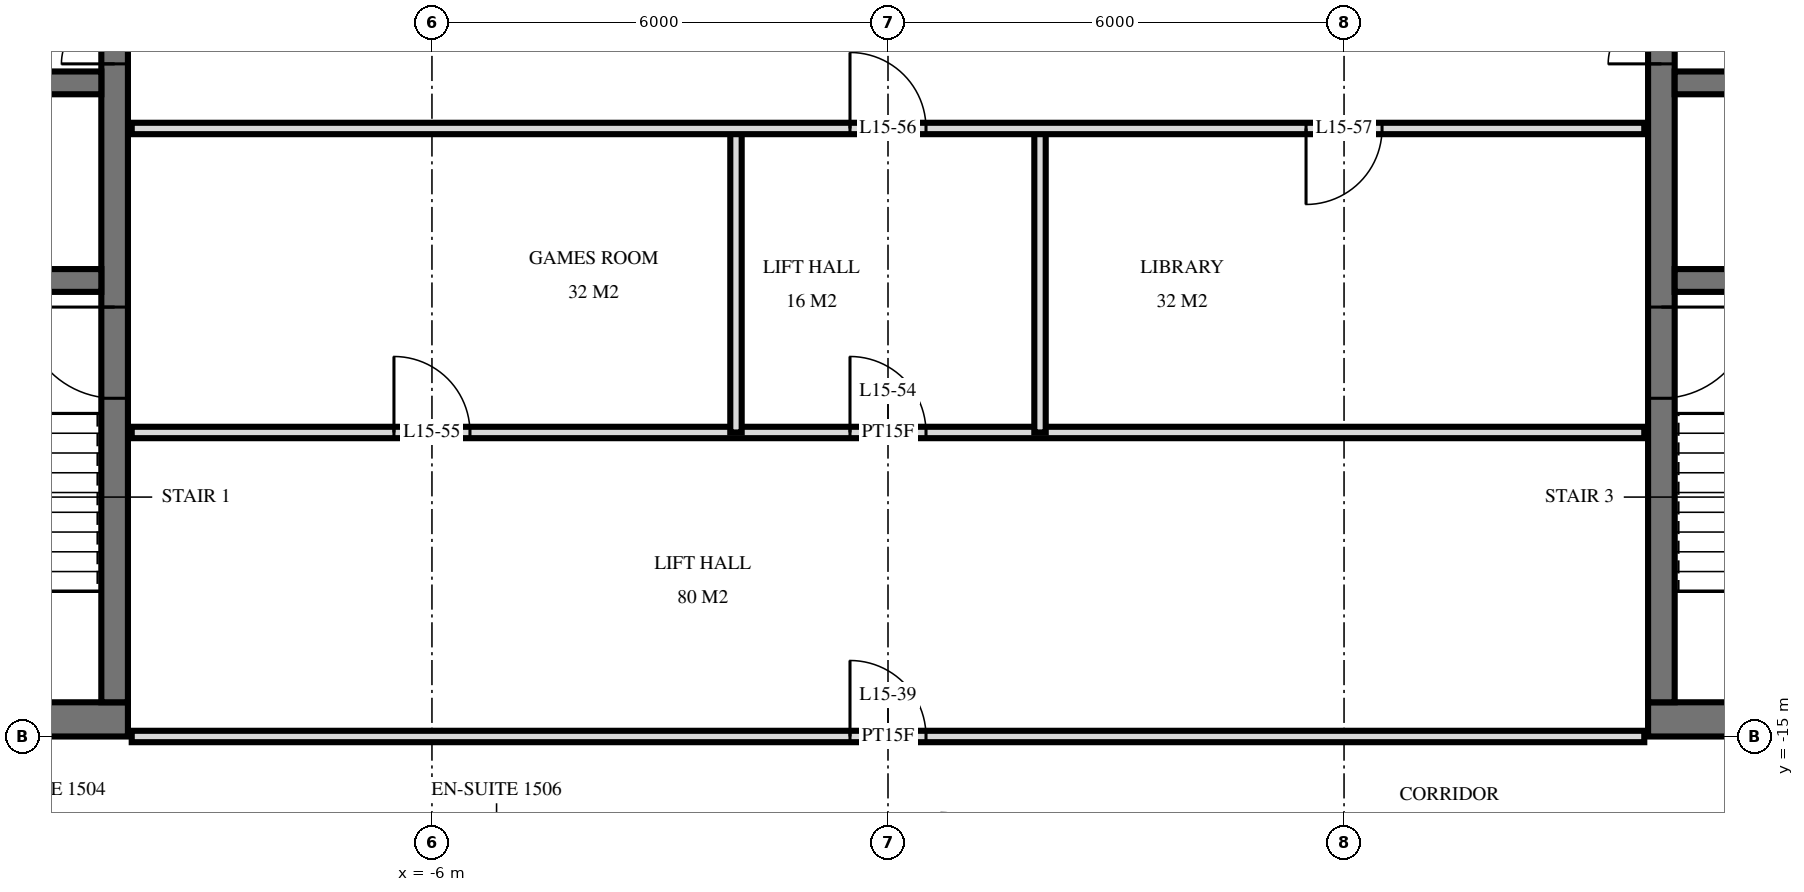
"""IFC4 building model, lengths in metres.
Left out: names, types, materials, properties, quantities, classifications, styles, units other than length and angle.
Written with IfcOpenShell. Run it as: python <this file> out.ifc"""

import sys

from ifc_helpers import new_model, si_unit, direction, frame, frame_2d, origin, place, context, subcontext, project, spatial, rectangle, extrude, element, fill, save


model = new_model("IFC4")
c1 = context("Model", 3, precision=1e-05, world=origin(), true_north=direction((0.0, 1.0)))
c2 = subcontext(c1, "Body", "Model", "MODEL_VIEW")
j1 = project(units=[si_unit("LENGTHUNIT", "METRE"), si_unit("PLANEANGLEUNIT", "RADIAN")], contexts=[c1])
p1 = place(None, origin())
s1 = spatial("IfcSite", under=j1, at=p1, CompositionType="ELEMENT")
p2 = place(p1, origin())
s2 = spatial("IfcBuilding", under=s1, at=p2, CompositionType="ELEMENT")
p3 = place(p2, frame((0.0, 0.0, 63.6)))
s3 = spatial("IfcBuildingStorey", under=s2, at=p3, CompositionType="ELEMENT", Elevation=63.6)
p4 = place(p3, frame((-29.5, -14.775, 0.0), z_axis=(0.0, 0.0, 1.0), x_axis=(1.0, 0.0, 0.0)))
e1 = element("IfcWall", 1, at=p4, inside=s3, PredefinedType="SHEAR", context=c2, shape_type="SweptSolid", body=[
    extrude(rectangle(XDim=19.5, YDim=0.45, at=frame_2d((9.75, 0.0))), origin(), (0.0, 0.0, 1.0), 3.6),
])
p5 = place(p4, frame((11.2, 0.0, 0.0)))
e2 = element("IfcOpeningElement", 2, at=p5, cuts=e1, PredefinedType="OPENING", context=c2, shape_type="SweptSolid", body=[
    extrude(rectangle(XDim=1.2, YDim=2.1, at=frame_2d((0.6, 1.05))), frame((0.0, 0.235, 0.0), z_axis=(0.0, -1.0, 0.0), x_axis=(1.0, 0.0, 0.0)), (0.0, 0.0, 1.0), 0.47),
])
p6 = place(p4, frame((14.25, 0.0, 0.0)))
e3 = element("IfcOpeningElement", 3, at=p6, cuts=e1, PredefinedType="OPENING", context=c2, shape_type="SweptSolid", body=[
    extrude(rectangle(XDim=1.1, YDim=2.1, at=frame_2d((0.55, 1.05))), frame((0.0, 0.235, 0.0), z_axis=(0.0, -1.0, 0.0), x_axis=(1.0, 0.0, 0.0)), (0.0, 0.0, 1.0), 0.47),
])
p7 = place(p4, frame((8.5, 0.0, 0.0)))
e4 = element("IfcOpeningElement", 4, at=p7, cuts=e1, PredefinedType="OPENING", context=c2, shape_type="SweptSolid", body=[
    extrude(rectangle(XDim=0.9, YDim=2.1, at=frame_2d((0.45, 1.05))), frame((0.0, 0.235, 0.0), z_axis=(0.0, -1.0, 0.0), x_axis=(1.0, 0.0, 0.0)), (0.0, 0.0, 1.0), 0.47),
])
p8 = place(p4, frame((6.05, 0.0, 0.0)))
e5 = element("IfcOpeningElement", 5, at=p8, cuts=e1, PredefinedType="OPENING", context=c2, shape_type="SweptSolid", body=[
    extrude(rectangle(XDim=1.0, YDim=2.1, at=frame_2d((0.5, 1.05))), frame((0.0, 0.235, 0.0), z_axis=(0.0, -1.0, 0.0), x_axis=(1.0, 0.0, 0.0)), (0.0, 0.0, 1.0), 0.47),
])
p9 = place(p4, frame((2.25, 0.0, 0.0)))
e6 = element("IfcOpeningElement", 6, at=p9, cuts=e1, PredefinedType="OPENING", context=c2, shape_type="SweptSolid", body=[
    extrude(rectangle(XDim=1.0, YDim=2.1, at=frame_2d((0.5, 1.05))), frame((0.0, 0.235, 0.0), z_axis=(0.0, -1.0, 0.0), x_axis=(1.0, 0.0, 0.0)), (0.0, 0.0, 1.0), 0.47),
])
p10 = place(p3, frame((-10.175, -14.55, 0.0), z_axis=(0.0, 0.0, 1.0), x_axis=(0.0, 1.0, 0.0)))
e7 = element("IfcWall", 7, at=p10, inside=s3, PredefinedType="SHEAR", context=c2, shape_type="SweptSolid", body=[
    extrude(rectangle(XDim=14.1, YDim=0.35, at=frame_2d((7.05, 0.0))), origin(), (0.0, 0.0, 1.0), 3.6),
])
p11 = place(p10, frame((8.4, 0.0, 0.0)))
e8 = element("IfcOpeningElement", 8, at=p11, cuts=e7, PredefinedType="OPENING", context=c2, shape_type="SweptSolid", body=[
    extrude(rectangle(XDim=1.4, YDim=2.4, at=frame_2d((0.7, 1.2))), frame((0.0, 0.185, 0.0), z_axis=(0.0, -1.0, 0.0), x_axis=(1.0, 0.0, 0.0)), (0.0, 0.0, 1.0), 0.37),
])
p12 = place(p10, frame((10.0, 0.0, 0.0)))
e9 = element("IfcOpeningElement", 9, at=p12, cuts=e7, PredefinedType="OPENING", context=c2, shape_type="SweptSolid", body=[
    extrude(rectangle(XDim=1.4, YDim=2.4, at=frame_2d((0.7, 1.2))), frame((0.0, 0.185, 0.0), z_axis=(0.0, -1.0, 0.0), x_axis=(1.0, 0.0, 0.0)), (0.0, 0.0, 1.0), 0.37),
])
p13 = place(p10, frame((4.0, 0.0, 0.0)))
e10 = element("IfcOpeningElement", 10, at=p13, cuts=e7, PredefinedType="OPENING", context=c2, shape_type="SweptSolid", body=[
    extrude(rectangle(XDim=1.2, YDim=2.1, at=frame_2d((0.6, 1.05))), frame((0.0, 0.185, 0.0), z_axis=(0.0, -1.0, 0.0), x_axis=(1.0, 0.0, 0.0)), (0.0, 0.0, 1.0), 0.37),
])
p14 = place(p3, frame((-29.05, -6.4, 0.0), z_axis=(0.0, 0.0, 1.0), x_axis=(1.0, 0.0, 0.0)))
e11 = element("IfcWall", 11, at=p14, inside=s3, PredefinedType="SHEAR", context=c2, shape_type="SweptSolid", body=[
    extrude(rectangle(XDim=18.7, YDim=0.3, at=frame_2d((9.35, 0.0))), origin(), (0.0, 0.0, 1.0), 3.6),
])
p15 = place(p14, frame((2.95, 0.0, 0.0)))
e12 = element("IfcOpeningElement", 12, at=p15, cuts=e11, PredefinedType="OPENING", context=c2, shape_type="SweptSolid", body=[
    extrude(rectangle(XDim=1.1, YDim=2.1, at=frame_2d((0.55, 1.05))), frame((0.0, 0.16, 0.0), z_axis=(0.0, -1.0, 0.0), x_axis=(1.0, 0.0, 0.0)), (0.0, 0.0, 1.0), 0.32),
])
p16 = place(p14, frame((0.55, 0.0, 0.0)))
e13 = element("IfcOpeningElement", 13, at=p16, cuts=e11, PredefinedType="OPENING", context=c2, shape_type="SweptSolid", body=[
    extrude(rectangle(XDim=1.1, YDim=2.1, at=frame_2d((0.55, 1.05))), frame((0.0, 0.16, 0.0), z_axis=(0.0, -1.0, 0.0), x_axis=(1.0, 0.0, 0.0)), (0.0, 0.0, 1.0), 0.32),
])
p17 = place(p14, frame((10.8, 0.0, 0.0)))
e14 = element("IfcOpeningElement", 14, at=p17, cuts=e11, PredefinedType="OPENING", context=c2, shape_type="SweptSolid", body=[
    extrude(rectangle(XDim=1.1, YDim=2.1, at=frame_2d((0.55, 1.05))), frame((0.0, 0.16, 0.0), z_axis=(0.0, -1.0, 0.0), x_axis=(1.0, 0.0, 0.0)), (0.0, 0.0, 1.0), 0.32),
])
p18 = place(p14, frame((5.6, 0.0, 0.0)))
e15 = element("IfcOpeningElement", 15, at=p18, cuts=e11, PredefinedType="OPENING", context=c2, shape_type="SweptSolid", body=[
    extrude(rectangle(XDim=1.0, YDim=2.1, at=frame_2d((0.5, 1.05))), frame((0.0, 0.16, 0.0), z_axis=(0.0, -1.0, 0.0), x_axis=(1.0, 0.0, 0.0)), (0.0, 0.0, 1.0), 0.32),
])
p19 = place(p3, frame((-29.05, -9.0, 0.0), z_axis=(0.0, 0.0, 1.0), x_axis=(1.0, 0.0, 0.0)))
e16 = element("IfcWall", 16, at=p19, inside=s3, PredefinedType="SHEAR", context=c2, shape_type="SweptSolid", body=[
    extrude(rectangle(XDim=18.7, YDim=0.3, at=frame_2d((9.35, 0.0))), origin(), (0.0, 0.0, 1.0), 3.6),
])
p20 = place(p19, frame((13.8, 0.0, 0.0)))
e17 = element("IfcOpeningElement", 17, at=p20, cuts=e16, PredefinedType="OPENING", context=c2, shape_type="SweptSolid", body=[
    extrude(rectangle(XDim=1.1, YDim=2.1, at=frame_2d((0.55, 1.05))), frame((0.0, 0.16, 0.0), z_axis=(0.0, -1.0, 0.0), x_axis=(1.0, 0.0, 0.0)), (0.0, 0.0, 1.0), 0.32),
])
p21 = place(p3, frame((10.0, -14.775, 0.0), z_axis=(0.0, 0.0, 1.0), x_axis=(1.0, 0.0, 0.0)))
e18 = element("IfcWall", 18, at=p21, inside=s3, PredefinedType="SHEAR", context=c2, shape_type="SweptSolid", body=[
    extrude(rectangle(XDim=19.5, YDim=0.45, at=frame_2d((9.75, 0.0))), origin(), (0.0, 0.0, 1.0), 3.6),
])
p22 = place(p21, frame((7.1, 0.0, 0.0)))
e19 = element("IfcOpeningElement", 19, at=p22, cuts=e18, PredefinedType="OPENING", context=c2, shape_type="SweptSolid", body=[
    extrude(rectangle(XDim=1.2, YDim=2.1, at=frame_2d((0.6, 1.05))), frame((0.0, 0.235, 0.0), z_axis=(0.0, -1.0, 0.0), x_axis=(1.0, 0.0, 0.0)), (0.0, 0.0, 1.0), 0.47),
])
p23 = place(p21, frame((4.15, 0.0, 0.0)))
e20 = element("IfcOpeningElement", 20, at=p23, cuts=e18, PredefinedType="OPENING", context=c2, shape_type="SweptSolid", body=[
    extrude(rectangle(XDim=1.1, YDim=2.1, at=frame_2d((0.55, 1.05))), frame((0.0, 0.235, 0.0), z_axis=(0.0, -1.0, 0.0), x_axis=(1.0, 0.0, 0.0)), (0.0, 0.0, 1.0), 0.47),
])
p24 = place(p21, frame((10.1, 0.0, 0.0)))
e21 = element("IfcOpeningElement", 21, at=p24, cuts=e18, PredefinedType="OPENING", context=c2, shape_type="SweptSolid", body=[
    extrude(rectangle(XDim=0.9, YDim=2.1, at=frame_2d((0.45, 1.05))), frame((0.0, 0.235, 0.0), z_axis=(0.0, -1.0, 0.0), x_axis=(1.0, 0.0, 0.0)), (0.0, 0.0, 1.0), 0.47),
])
p25 = place(p21, frame((12.45, 0.0, 0.0)))
e22 = element("IfcOpeningElement", 22, at=p25, cuts=e18, PredefinedType="OPENING", context=c2, shape_type="SweptSolid", body=[
    extrude(rectangle(XDim=1.0, YDim=2.1, at=frame_2d((0.5, 1.05))), frame((0.0, 0.235, 0.0), z_axis=(0.0, -1.0, 0.0), x_axis=(1.0, 0.0, 0.0)), (0.0, 0.0, 1.0), 0.47),
])
p26 = place(p21, frame((16.25, 0.0, 0.0)))
e23 = element("IfcOpeningElement", 23, at=p26, cuts=e18, PredefinedType="OPENING", context=c2, shape_type="SweptSolid", body=[
    extrude(rectangle(XDim=1.0, YDim=2.1, at=frame_2d((0.5, 1.05))), frame((0.0, 0.235, 0.0), z_axis=(0.0, -1.0, 0.0), x_axis=(1.0, 0.0, 0.0)), (0.0, 0.0, 1.0), 0.47),
])
p27 = place(p3, frame((10.175, -14.55, 0.0), z_axis=(0.0, 0.0, 1.0), x_axis=(0.0, 1.0, 0.0)))
e24 = element("IfcWall", 24, at=p27, inside=s3, PredefinedType="SHEAR", context=c2, shape_type="SweptSolid", body=[
    extrude(rectangle(XDim=14.1, YDim=0.35, at=frame_2d((7.05, 0.0))), origin(), (0.0, 0.0, 1.0), 3.6),
])
p28 = place(p27, frame((8.4, 0.0, 0.0)))
e25 = element("IfcOpeningElement", 25, at=p28, cuts=e24, PredefinedType="OPENING", context=c2, shape_type="SweptSolid", body=[
    extrude(rectangle(XDim=1.4, YDim=2.4, at=frame_2d((0.7, 1.2))), frame((0.0, 0.185, 0.0), z_axis=(0.0, -1.0, 0.0), x_axis=(1.0, 0.0, 0.0)), (0.0, 0.0, 1.0), 0.37),
])
p29 = place(p27, frame((10.0, 0.0, 0.0)))
e26 = element("IfcOpeningElement", 26, at=p29, cuts=e24, PredefinedType="OPENING", context=c2, shape_type="SweptSolid", body=[
    extrude(rectangle(XDim=1.4, YDim=2.4, at=frame_2d((0.7, 1.2))), frame((0.0, 0.185, 0.0), z_axis=(0.0, -1.0, 0.0), x_axis=(1.0, 0.0, 0.0)), (0.0, 0.0, 1.0), 0.37),
])
p30 = place(p27, frame((4.0, 0.0, 0.0)))
e27 = element("IfcOpeningElement", 27, at=p30, cuts=e24, PredefinedType="OPENING", context=c2, shape_type="SweptSolid", body=[
    extrude(rectangle(XDim=1.2, YDim=2.1, at=frame_2d((0.6, 1.05))), frame((0.0, 0.185, 0.0), z_axis=(0.0, -1.0, 0.0), x_axis=(1.0, 0.0, 0.0)), (0.0, 0.0, 1.0), 0.37),
])
p31 = place(p3, frame((10.35, -6.4, 0.0), z_axis=(0.0, 0.0, 1.0), x_axis=(1.0, 0.0, 0.0)))
e28 = element("IfcWall", 28, at=p31, inside=s3, PredefinedType="SHEAR", context=c2, shape_type="SweptSolid", body=[
    extrude(rectangle(XDim=18.7, YDim=0.3, at=frame_2d((9.35, 0.0))), origin(), (0.0, 0.0, 1.0), 3.6),
])
p32 = place(p31, frame((14.65, 0.0, 0.0)))
e29 = element("IfcOpeningElement", 29, at=p32, cuts=e28, PredefinedType="OPENING", context=c2, shape_type="SweptSolid", body=[
    extrude(rectangle(XDim=1.1, YDim=2.1, at=frame_2d((0.55, 1.05))), frame((0.0, 0.16, 0.0), z_axis=(0.0, -1.0, 0.0), x_axis=(1.0, 0.0, 0.0)), (0.0, 0.0, 1.0), 0.32),
])
p33 = place(p31, frame((17.05, 0.0, 0.0)))
e30 = element("IfcOpeningElement", 30, at=p33, cuts=e28, PredefinedType="OPENING", context=c2, shape_type="SweptSolid", body=[
    extrude(rectangle(XDim=1.1, YDim=2.1, at=frame_2d((0.55, 1.05))), frame((0.0, 0.16, 0.0), z_axis=(0.0, -1.0, 0.0), x_axis=(1.0, 0.0, 0.0)), (0.0, 0.0, 1.0), 0.32),
])
p34 = place(p31, frame((6.8, 0.0, 0.0)))
e31 = element("IfcOpeningElement", 31, at=p34, cuts=e28, PredefinedType="OPENING", context=c2, shape_type="SweptSolid", body=[
    extrude(rectangle(XDim=1.1, YDim=2.1, at=frame_2d((0.55, 1.05))), frame((0.0, 0.16, 0.0), z_axis=(0.0, -1.0, 0.0), x_axis=(1.0, 0.0, 0.0)), (0.0, 0.0, 1.0), 0.32),
])
p35 = place(p31, frame((12.1, 0.0, 0.0)))
e32 = element("IfcOpeningElement", 32, at=p35, cuts=e28, PredefinedType="OPENING", context=c2, shape_type="SweptSolid", body=[
    extrude(rectangle(XDim=1.0, YDim=2.1, at=frame_2d((0.5, 1.05))), frame((0.0, 0.16, 0.0), z_axis=(0.0, -1.0, 0.0), x_axis=(1.0, 0.0, 0.0)), (0.0, 0.0, 1.0), 0.32),
])
p36 = place(p3, frame((10.35, -9.0, 0.0), z_axis=(0.0, 0.0, 1.0), x_axis=(1.0, 0.0, 0.0)))
e33 = element("IfcWall", 33, at=p36, inside=s3, PredefinedType="SHEAR", context=c2, shape_type="SweptSolid", body=[
    extrude(rectangle(XDim=18.7, YDim=0.3, at=frame_2d((9.35, 0.0))), origin(), (0.0, 0.0, 1.0), 3.6),
])
p37 = place(p36, frame((3.8, 0.0, 0.0)))
e34 = element("IfcOpeningElement", 34, at=p37, cuts=e33, PredefinedType="OPENING", context=c2, shape_type="SweptSolid", body=[
    extrude(rectangle(XDim=1.1, YDim=2.1, at=frame_2d((0.55, 1.05))), frame((0.0, 0.16, 0.0), z_axis=(0.0, -1.0, 0.0), x_axis=(1.0, 0.0, 0.0)), (0.0, 0.0, 1.0), 0.32),
])
for number, where, z_axis, x_axis in (
    (35, (2.0, -11.0, 0.0), (0.0, 0.0, 1.0), (0.0, 1.0, 0.0)),
    (36, (-2.0, -11.0, 0.0), (0.0, 0.0, 1.0), (0.0, 1.0, 0.0)),
):
    element("IfcWall", number, at=place(p3, frame(where, z_axis=z_axis, x_axis=x_axis)), inside=s3, PredefinedType="PARTITIONING", context=c2, shape_type="SweptSolid", body=[
        extrude(rectangle(XDim=4.0, YDim=0.15, at=frame_2d((2.0, 0.0))), origin(), (0.0, 0.0, 1.0), 3.32),
    ])
p38 = place(p3, frame((-9.95, -15.0, 0.0), z_axis=(0.0, 0.0, 1.0), x_axis=(1.0, 0.0, 0.0)))
e37 = element("IfcWall", 37, at=p38, inside=s3, PredefinedType="PARTITIONING", context=c2, shape_type="SweptSolid", body=[
    extrude(rectangle(XDim=19.9, YDim=0.15, at=frame_2d((9.95, 0.0))), origin(), (0.0, 0.0, 1.0), 2.684),
])
p39 = place(p38, frame((9.45, 0.0, 0.0)))
e38 = element("IfcOpeningElement", 38, at=p39, cuts=e37, PredefinedType="OPENING", context=c2, shape_type="SweptSolid", body=[
    extrude(rectangle(XDim=1.0, YDim=2.1, at=frame_2d((0.5, 1.05))), frame((0.0, 0.085, 0.0), z_axis=(0.0, -1.0, 0.0), x_axis=(1.0, 0.0, 0.0)), (0.0, 0.0, 1.0), 0.17),
])
p40 = place(p3, frame((-9.95, -11.0, 0.0), z_axis=(0.0, 0.0, 1.0), x_axis=(1.0, 0.0, 0.0)))
e39 = element("IfcWall", 39, at=p40, inside=s3, PredefinedType="PARTITIONING", context=c2, shape_type="SweptSolid", body=[
    extrude(rectangle(XDim=19.9, YDim=0.15, at=frame_2d((9.95, 0.0))), origin(), (0.0, 0.0, 1.0), 3.32),
])
p41 = place(p40, frame((9.45, 0.0, 0.0)))
e40 = element("IfcOpeningElement", 40, at=p41, cuts=e39, PredefinedType="OPENING", context=c2, shape_type="SweptSolid", body=[
    extrude(rectangle(XDim=1.0, YDim=2.1, at=frame_2d((0.5, 1.05))), frame((0.0, 0.085, 0.0), z_axis=(0.0, -1.0, 0.0), x_axis=(1.0, 0.0, 0.0)), (0.0, 0.0, 1.0), 0.17),
])
p42 = place(p40, frame((3.45, 0.0, 0.0)))
e41 = element("IfcOpeningElement", 41, at=p42, cuts=e39, PredefinedType="OPENING", context=c2, shape_type="SweptSolid", body=[
    extrude(rectangle(XDim=1.0, YDim=2.1, at=frame_2d((0.5, 1.05))), frame((0.0, 0.085, 0.0), z_axis=(0.0, -1.0, 0.0), x_axis=(1.0, 0.0, 0.0)), (0.0, 0.0, 1.0), 0.17),
])
p43 = place(p3, frame((-9.95, -7.0, 0.0), z_axis=(0.0, 0.0, 1.0), x_axis=(1.0, 0.0, 0.0)))
e42 = element("IfcWall", 42, at=p43, inside=s3, PredefinedType="PARTITIONING", context=c2, shape_type="SweptSolid", body=[
    extrude(rectangle(XDim=19.9, YDim=0.15, at=frame_2d((9.95, 0.0))), origin(), (0.0, 0.0, 1.0), 3.32),
])
p44 = place(p43, frame((9.45, 0.0, 0.0)))
e43 = element("IfcOpeningElement", 43, at=p44, cuts=e42, PredefinedType="OPENING", context=c2, shape_type="SweptSolid", body=[
    extrude(rectangle(XDim=1.0, YDim=2.1, at=frame_2d((0.5, 1.05))), frame((0.0, 0.085, 0.0), z_axis=(0.0, -1.0, 0.0), x_axis=(1.0, 0.0, 0.0)), (0.0, 0.0, 1.0), 0.17),
])
p45 = place(p43, frame((15.45, 0.0, 0.0)))
e44 = element("IfcOpeningElement", 44, at=p45, cuts=e42, PredefinedType="OPENING", context=c2, shape_type="SweptSolid", body=[
    extrude(rectangle(XDim=1.0, YDim=2.1, at=frame_2d((0.5, 1.05))), frame((0.0, 0.085, 0.0), z_axis=(0.0, -1.0, 0.0), x_axis=(1.0, 0.0, 0.0)), (0.0, 0.0, 1.0), 0.17),
])
p46 = place(p11, origin())
e45 = element("IfcDoor", 45, at=p46, inside=s3, OperationType="DOUBLE_DOOR_SINGLE_SWING", PredefinedType="DOOR", context=c2, shape_type="SweptSolid", body=[
    extrude(rectangle(XDim=1.4, YDim=2.4, at=frame_2d((0.7, 1.2))), frame((0.0, 0.025, 0.0), z_axis=(0.0, -1.0, 0.0), x_axis=(1.0, 0.0, 0.0)), (0.0, 0.0, 1.0), 0.05),
])
fill(e8, e45)
p47 = place(p13, origin())
e46 = element("IfcDoor", 46, at=p47, inside=s3, OperationType="SINGLE_SWING_LEFT", PredefinedType="DOOR", context=c2, shape_type="SweptSolid", body=[
    extrude(rectangle(XDim=1.2, YDim=2.1, at=frame_2d((0.6, 1.05))), frame((0.0, 0.025, 0.0), z_axis=(0.0, -1.0, 0.0), x_axis=(1.0, 0.0, 0.0)), (0.0, 0.0, 1.0), 0.05),
])
fill(e10, e46)
p48 = place(p28, origin())
e47 = element("IfcDoor", 47, at=p48, inside=s3, OperationType="DOUBLE_DOOR_SINGLE_SWING", PredefinedType="DOOR", context=c2, shape_type="SweptSolid", body=[
    extrude(rectangle(XDim=1.4, YDim=2.4, at=frame_2d((0.7, 1.2))), frame((0.0, 0.025, 0.0), z_axis=(0.0, -1.0, 0.0), x_axis=(1.0, 0.0, 0.0)), (0.0, 0.0, 1.0), 0.05),
])
fill(e25, e47)
p49 = place(p30, frame((0.6, 0.0, 0.0), z_axis=(0.0, 0.0, 1.0), x_axis=(-1.0, 0.0, 0.0)))
e48 = element("IfcDoor", 48, at=p49, inside=s3, OperationType="SINGLE_SWING_RIGHT", PredefinedType="DOOR", context=c2, shape_type="SweptSolid", body=[
    extrude(rectangle(XDim=1.2, YDim=2.1, at=frame_2d((0.0, 1.05))), frame((0.0, -0.025, 0.0), z_axis=(0.0, 1.0, 0.0), x_axis=(-1.0, 0.0, 0.0)), (0.0, 0.0, 1.0), 0.05),
])
fill(e27, e48)
p50 = place(p39, origin())
e49 = element("IfcDoor", 49, at=p50, inside=s3, OperationType="SINGLE_SWING_RIGHT", PredefinedType="DOOR", context=c2, shape_type="SweptSolid", body=[
    extrude(rectangle(XDim=1.0, YDim=2.1, at=frame_2d((0.5, 1.05))), frame((0.0, 0.025, 0.0), z_axis=(0.0, -1.0, 0.0), x_axis=(1.0, 0.0, 0.0)), (0.0, 0.0, 1.0), 0.05),
])
fill(e38, e49)
p51 = place(p41, origin())
e50 = element("IfcDoor", 50, at=p51, inside=s3, OperationType="SINGLE_SWING_RIGHT", PredefinedType="DOOR", context=c2, shape_type="SweptSolid", body=[
    extrude(rectangle(XDim=1.0, YDim=2.1, at=frame_2d((0.5, 1.05))), frame((0.0, 0.025, 0.0), z_axis=(0.0, -1.0, 0.0), x_axis=(1.0, 0.0, 0.0)), (0.0, 0.0, 1.0), 0.05),
])
fill(e40, e50)
p52 = place(p42, origin())
e51 = element("IfcDoor", 51, at=p52, inside=s3, OperationType="SINGLE_SWING_RIGHT", PredefinedType="DOOR", context=c2, shape_type="SweptSolid", body=[
    extrude(rectangle(XDim=1.0, YDim=2.1, at=frame_2d((0.5, 1.05))), frame((0.0, 0.025, 0.0), z_axis=(0.0, -1.0, 0.0), x_axis=(1.0, 0.0, 0.0)), (0.0, 0.0, 1.0), 0.05),
])
fill(e41, e51)
p53 = place(p44, origin())
e52 = element("IfcDoor", 52, at=p53, inside=s3, OperationType="SINGLE_SWING_RIGHT", PredefinedType="DOOR", context=c2, shape_type="SweptSolid", body=[
    extrude(rectangle(XDim=1.0, YDim=2.1, at=frame_2d((0.5, 1.05))), frame((0.0, 0.025, 0.0), z_axis=(0.0, -1.0, 0.0), x_axis=(1.0, 0.0, 0.0)), (0.0, 0.0, 1.0), 0.05),
])
fill(e43, e52)
p54 = place(p45, frame((0.5, 0.0, 0.0), z_axis=(0.0, 0.0, 1.0), x_axis=(-1.0, 0.0, 0.0)))
e53 = element("IfcDoor", 53, at=p54, inside=s3, OperationType="SINGLE_SWING_LEFT", PredefinedType="DOOR", context=c2, shape_type="SweptSolid", body=[
    extrude(rectangle(XDim=1.0, YDim=2.1, at=frame_2d((0.0, 1.05))), frame((0.0, -0.025, 0.0), z_axis=(0.0, 1.0, 0.0), x_axis=(-1.0, 0.0, 0.0)), (0.0, 0.0, 1.0), 0.05),
])
fill(e44, e53)
save(model, sys.argv[1])
